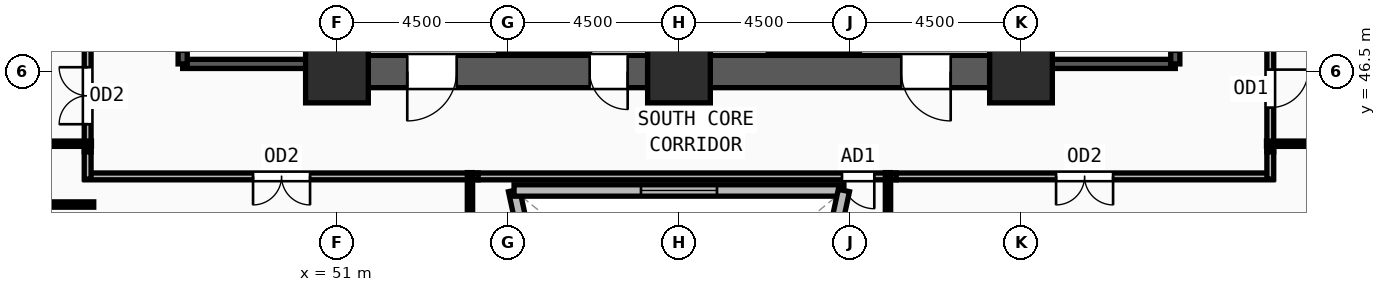
"""IFC4 building model, lengths in metres.
Left out: names, types, materials, properties, quantities, classifications, styles, units other than length and angle.
Written with IfcOpenShell. Run it as: python <this file> out.ifc"""

import sys

from ifc_helpers import new_model, si_unit, direction, frame, frame_2d, origin, origin_2d, place, context, subcontext, project, spatial, rectangle, extrude, source, transform, mapped, element, fill, save


model = new_model("IFC4")
c1 = context("Model", 3, precision=1e-05, world=origin(), true_north=direction((0.0, 1.0)))
c2 = subcontext(c1, "Body", "Model", "MODEL_VIEW")
j1 = project(units=[si_unit("LENGTHUNIT", "METRE"), si_unit("PLANEANGLEUNIT", "RADIAN")], contexts=[c1])
p1 = place(None, origin())
s1 = spatial("IfcSite", under=j1, at=p1, CompositionType="ELEMENT")
p2 = place(p1, origin())
s2 = spatial("IfcBuilding", under=s1, at=p2, CompositionType="ELEMENT")
p3 = place(p2, frame((0.0, 0.0, 51.75)))
s3 = spatial("IfcBuildingStorey", under=s2, at=p3, CompositionType="ELEMENT", Elevation=51.75)
m1 = source(origin(), c2, "Body", "SweptSolid", [
    extrude(rectangle(XDim=1.65, YDim=1.65, at=origin_2d()), origin(), (0.0, 0.0, 1.0), 3.75),
])
for number, where, z_axis, x_axis in (
    (1, (51.0, 46.5, 0.0), (0.0, 0.0, 1.0), (1.0, 0.0, 0.0)),
    (2, (60.0, 46.5, 0.0), (0.0, 0.0, 1.0), (1.0, 0.0, 0.0)),
    (3, (69.0, 46.5, 0.0), (0.0, 0.0, 1.0), (1.0, 0.0, 0.0)),
):
    element("IfcColumn", number, at=place(p3, frame(where, z_axis=z_axis, x_axis=x_axis)), inside=s3, PredefinedType="COLUMN", context=c2, shape_type="MappedRepresentation", body=[
        mapped(m1, transform((0.0, 0.0, 0.0), x_axis=(1.0, 0.0, 0.0), y_axis=(0.0, 1.0, 0.0), z_axis=(0.0, 0.0, 1.0), scale=1.0)),
    ])
p4 = place(p3, frame((68.175, 46.5, 0.0), z_axis=(0.0, 0.0, 1.0), x_axis=(-1.0, 0.0, 0.0)))
e4 = element("IfcWall", 4, at=p4, inside=s3, PredefinedType="SHEAR", context=c2, shape_type="SweptSolid", body=[
    extrude(rectangle(XDim=7.35, YDim=0.85, at=frame_2d((3.675, 0.0))), origin(), (0.0, 0.0, 1.0), 3.57),
])
m2 = source(origin(), c2, "Body", "SweptSolid", [
    extrude(rectangle(XDim=1.3, YDim=2.2, at=frame_2d((0.65, 1.1))), frame((0.0, 0.435, 0.0), z_axis=(0.0, -1.0, 0.0), x_axis=(1.0, 0.0, 0.0)), (0.0, 0.0, 1.0), 0.87),
])
p5 = place(p4, frame((1.025, 0.0, 0.0)))
e5 = element("IfcOpeningElement", 5, at=p5, cuts=e4, PredefinedType="OPENING", context=c2, shape_type="MappedRepresentation", body=[
    mapped(m2, transform((0.0, 0.0, 0.0), x_axis=(1.0, 0.0, 0.0), y_axis=(0.0, 1.0, 0.0), z_axis=(0.0, 0.0, 1.0), scale=1.0)),
])
p6 = place(p3, frame((59.175, 46.5, 0.0), z_axis=(0.0, 0.0, 1.0), x_axis=(-1.0, 0.0, 0.0)))
e6 = element("IfcWall", 6, at=p6, inside=s3, PredefinedType="SHEAR", context=c2, shape_type="SweptSolid", body=[
    extrude(rectangle(XDim=7.35, YDim=0.85, at=frame_2d((3.675, 0.0))), origin(), (0.0, 0.0, 1.0), 3.57),
])
p7 = place(p6, frame((5.025, 0.0, 0.0)))
e7 = element("IfcOpeningElement", 7, at=p7, cuts=e6, PredefinedType="OPENING", context=c2, shape_type="MappedRepresentation", body=[
    mapped(m2, transform((0.0, 0.0, 0.0), x_axis=(1.0, 0.0, 0.0), y_axis=(0.0, 1.0, 0.0), z_axis=(0.0, 0.0, 1.0), scale=1.0)),
])
m3 = source(origin(), c2, "Body", "SweptSolid", [
    extrude(rectangle(XDim=1.0, YDim=2.2, at=frame_2d((0.5, 1.1))), frame((0.0, 0.435, 0.0), z_axis=(0.0, -1.0, 0.0), x_axis=(1.0, 0.0, 0.0)), (0.0, 0.0, 1.0), 0.87),
])
p8 = place(p6, frame((0.525, 0.0, 0.0)))
e8 = element("IfcOpeningElement", 8, at=p8, cuts=e6, PredefinedType="OPENING", context=c2, shape_type="MappedRepresentation", body=[
    mapped(m3, transform((0.0, 0.0, 0.0), x_axis=(1.0, 0.0, 0.0), y_axis=(0.0, 1.0, 0.0), z_axis=(0.0, 0.0, 1.0), scale=1.0)),
])
p9 = place(p3, frame((46.94, 46.7, 0.0), z_axis=(0.0, 0.0, 1.0), x_axis=(1.0, 0.0, 0.0)))
e9 = element("IfcWall", 9, at=p9, inside=s3, PredefinedType="SOLIDWALL", context=c2, shape_type="SweptSolid", body=[
    extrude(rectangle(XDim=3.44, YDim=0.24, at=frame_2d((1.72, 0.0))), origin(), (0.0, 0.0, 1.0), 3.57),
])
p10 = place(p3, frame((50.38, 46.7, 0.0), z_axis=(0.0, 0.0, 1.0), x_axis=(0.0, 1.0, 0.0)))
e10 = element("IfcWall", 10, at=p10, inside=s3, PredefinedType="SOLIDWALL", context=c2, shape_type="SweptSolid", body=[
    extrude(rectangle(XDim=7.82, YDim=0.24, at=frame_2d((3.91, 0.0))), origin(), (0.0, 0.0, 1.0), 3.57),
])
p11 = place(p3, frame((46.94, 54.52, 0.0), z_axis=(0.0, 0.0, 1.0), x_axis=(0.0, -1.0, 0.0)))
e11 = element("IfcWall", 11, at=p11, inside=s3, PredefinedType="SOLIDWALL", context=c2, shape_type="SweptSolid", body=[
    extrude(rectangle(XDim=7.82, YDim=0.24, at=frame_2d((3.91, 0.0))), origin(), (0.0, 0.0, 1.0), 3.57),
])
m4 = source(origin(), c2, "Body", "SweptSolid", [
    extrude(rectangle(XDim=1.2, YDim=2.2, at=frame_2d((0.6, 1.1))), frame((0.0, 0.13, 0.0), z_axis=(0.0, -1.0, 0.0), x_axis=(1.0, 0.0, 0.0)), (0.0, 0.0, 1.0), 0.26),
])
p12 = place(p11, frame((6.3, 0.0, 0.0)))
e12 = element("IfcOpeningElement", 12, at=p12, cuts=e11, PredefinedType="OPENING", context=c2, shape_type="MappedRepresentation", body=[
    mapped(m4, transform((0.0, 0.0, 0.0), x_axis=(1.0, 0.0, 0.0), y_axis=(0.0, 1.0, 0.0), z_axis=(0.0, 0.0, 1.0), scale=1.0)),
])
p13 = place(p3, frame((69.62, 46.7, 0.0), z_axis=(0.0, 0.0, 1.0), x_axis=(1.0, 0.0, 0.0)))
e13 = element("IfcWall", 13, at=p13, inside=s3, PredefinedType="SOLIDWALL", context=c2, shape_type="SweptSolid", body=[
    extrude(rectangle(XDim=3.44, YDim=0.24, at=frame_2d((1.72, 0.0))), origin(), (0.0, 0.0, 1.0), 3.57),
])
p14 = place(p3, frame((73.06, 46.7, 0.0), z_axis=(0.0, 0.0, 1.0), x_axis=(0.0, 1.0, 0.0)))
e14 = element("IfcWall", 14, at=p14, inside=s3, PredefinedType="SOLIDWALL", context=c2, shape_type="SweptSolid", body=[
    extrude(rectangle(XDim=7.82, YDim=0.24, at=frame_2d((3.91, 0.0))), origin(), (0.0, 0.0, 1.0), 3.57),
])
p15 = place(p14, frame((0.32, 0.0, 0.0)))
e15 = element("IfcOpeningElement", 15, at=p15, cuts=e14, PredefinedType="OPENING", context=c2, shape_type="MappedRepresentation", body=[
    mapped(m4, transform((0.0, 0.0, 0.0), x_axis=(1.0, 0.0, 0.0), y_axis=(0.0, 1.0, 0.0), z_axis=(0.0, 0.0, 1.0), scale=1.0)),
])
p16 = place(p3, frame((69.62, 54.52, 0.0), z_axis=(0.0, 0.0, 1.0), x_axis=(0.0, -1.0, 0.0)))
e16 = element("IfcWall", 16, at=p16, inside=s3, PredefinedType="SOLIDWALL", context=c2, shape_type="SweptSolid", body=[
    extrude(rectangle(XDim=7.82, YDim=0.24, at=frame_2d((3.91, 0.0))), origin(), (0.0, 0.0, 1.0), 3.57),
])
p17 = place(p3, frame((57.179, 36.346, 0.0), z_axis=(0.0, 0.0, 1.0), x_axis=(-0.211373141383, 0.977405440491, 0.0)))
e17 = element("IfcWall", 17, at=p17, inside=s3, PredefinedType="SOLIDWALL", context=c2, shape_type="SweptSolid", body=[
    extrude(rectangle(XDim=7.187, YDim=0.3, at=frame_2d((3.593, 0.0))), origin(), (0.0, 0.0, 1.0), 3.57),
])
m5 = source(origin(), c2, "Body", "SweptSolid", [
    extrude(rectangle(XDim=2.0, YDim=1.9, at=frame_2d((1.0, 0.95))), frame((0.0, 0.16, 0.0), z_axis=(0.0, -1.0, 0.0), x_axis=(1.0, 0.0, 0.0)), (0.0, 0.0, 1.0), 0.32),
])
p18 = place(p17, frame((2.593, 0.0, 0.55)))
e18 = element("IfcOpeningElement", 18, at=p18, cuts=e17, PredefinedType="OPENING", context=c2, shape_type="MappedRepresentation", body=[
    mapped(m5, transform((0.0, 0.0, 0.0), x_axis=(1.0, 0.0, 0.0), y_axis=(0.0, 1.0, 0.0), z_axis=(0.0, 0.0, 1.0), scale=1.0)),
])
p19 = place(p3, frame((55.66, 43.37, 0.0), z_axis=(0.0, 0.0, 1.0), x_axis=(1.0, 0.0, 0.0)))
e19 = element("IfcWall", 19, at=p19, inside=s3, PredefinedType="SOLIDWALL", context=c2, shape_type="SweptSolid", body=[
    extrude(rectangle(XDim=8.68, YDim=0.3, at=frame_2d((4.34, 0.0))), origin(), (0.0, 0.0, 1.0), 3.57),
])
p20 = place(p19, frame((3.34, 0.0, 0.55)))
e20 = element("IfcOpeningElement", 20, at=p20, cuts=e19, PredefinedType="OPENING", context=c2, shape_type="MappedRepresentation", body=[
    mapped(m5, transform((0.0, 0.0, 0.0), x_axis=(1.0, 0.0, 0.0), y_axis=(0.0, 1.0, 0.0), z_axis=(0.0, 0.0, 1.0), scale=1.0)),
])
p21 = place(p3, frame((64.34, 43.37, 0.0), z_axis=(0.0, 0.0, 1.0), x_axis=(-0.211373141383, -0.977405440491, 0.0)))
e21 = element("IfcWall", 21, at=p21, inside=s3, PredefinedType="SOLIDWALL", context=c2, shape_type="SweptSolid", body=[
    extrude(rectangle(XDim=7.187, YDim=0.3, at=frame_2d((3.593, 0.0))), origin(), (0.0, 0.0, 1.0), 3.57),
])
p22 = place(p21, frame((2.593, 0.0, 0.55)))
e22 = element("IfcOpeningElement", 22, at=p22, cuts=e21, PredefinedType="OPENING", context=c2, shape_type="MappedRepresentation", body=[
    mapped(m5, transform((0.0, 0.0, 0.0), x_axis=(1.0, 0.0, 0.0), y_axis=(0.0, 1.0, 0.0), z_axis=(0.0, 0.0, 1.0), scale=1.0)),
])
p23 = place(p3, frame((44.44, 44.385, 0.0), z_axis=(0.0, 0.0, 1.0), x_axis=(0.0, 1.0, 0.0)))
e23 = element("IfcWall", 23, at=p23, inside=s3, PredefinedType="PARTITIONING", context=c2, shape_type="SweptSolid", body=[
    extrude(rectangle(XDim=2.955, YDim=0.18, at=frame_2d((1.478, 0.0))), origin(), (0.0, 0.0, 1.0), 3.57),
])
m6 = source(origin(), c2, "Body", "SweptSolid", [
    extrude(rectangle(XDim=1.5, YDim=2.2, at=frame_2d((0.75, 1.1))), frame((0.0, 0.1, 0.0), z_axis=(0.0, -1.0, 0.0), x_axis=(1.0, 0.0, 0.0)), (0.0, 0.0, 1.0), 0.2),
])
p24 = place(p23, frame((0.728, 0.0, 0.0)))
e24 = element("IfcOpeningElement", 24, at=p24, cuts=e23, PredefinedType="OPENING", context=c2, shape_type="MappedRepresentation", body=[
    mapped(m6, transform((0.0, 0.0, 0.0), x_axis=(1.0, 0.0, 0.0), y_axis=(0.0, 1.0, 0.0), z_axis=(0.0, 0.0, 1.0), scale=1.0)),
])
p25 = place(p3, frame((54.715, 43.74, 0.0), z_axis=(0.0, 0.0, 1.0), x_axis=(-1.0, 0.0, 0.0)))
e25 = element("IfcWall", 25, at=p25, inside=s3, PredefinedType="PARTITIONING", context=c2, shape_type="SweptSolid", body=[
    extrude(rectangle(XDim=10.345, YDim=0.18, at=frame_2d((5.172, 0.0))), origin(), (0.0, 0.0, 1.0), 3.57),
])
p26 = place(p25, frame((4.423, 0.0, 0.0)))
e26 = element("IfcOpeningElement", 26, at=p26, cuts=e25, PredefinedType="OPENING", context=c2, shape_type="MappedRepresentation", body=[
    mapped(m6, transform((0.0, 0.0, 0.0), x_axis=(1.0, 0.0, 0.0), y_axis=(0.0, 1.0, 0.0), z_axis=(0.0, 0.0, 1.0), scale=1.0)),
])
p27 = place(p3, frame((65.715, 43.74, 0.0), z_axis=(0.0, 0.0, 1.0), x_axis=(-1.0, 0.0, 0.0)))
e27 = element("IfcWall", 27, at=p27, inside=s3, PredefinedType="PARTITIONING", context=c2, shape_type="SweptSolid", body=[
    extrude(rectangle(XDim=11.0, YDim=0.18, at=frame_2d((5.5, 0.0))), origin(), (0.0, 0.0, 1.0), 3.57),
])
m7 = source(origin(), c2, "Body", "SweptSolid", [
    extrude(rectangle(XDim=0.85, YDim=2.1, at=frame_2d((0.425, 1.05))), frame((0.0, 0.1, 0.0), z_axis=(0.0, -1.0, 0.0), x_axis=(1.0, 0.0, 0.0)), (0.0, 0.0, 1.0), 0.2),
])
p28 = place(p27, frame((0.575, 0.0, 0.0)))
e28 = element("IfcOpeningElement", 28, at=p28, cuts=e27, PredefinedType="OPENING", context=c2, shape_type="MappedRepresentation", body=[
    mapped(m7, transform((0.0, 0.0, 0.0), x_axis=(1.0, 0.0, 0.0), y_axis=(0.0, 1.0, 0.0), z_axis=(0.0, 0.0, 1.0), scale=1.0)),
])
p29 = place(p3, frame((75.63, 43.74, 0.0), z_axis=(0.0, 0.0, 1.0), x_axis=(-1.0, 0.0, 0.0)))
e29 = element("IfcWall", 29, at=p29, inside=s3, PredefinedType="PARTITIONING", context=c2, shape_type="SweptSolid", body=[
    extrude(rectangle(XDim=9.915, YDim=0.18, at=frame_2d((4.958, 0.0))), origin(), (0.0, 0.0, 1.0), 3.57),
])
p30 = place(p29, frame((4.207, 0.0, 0.0)))
e30 = element("IfcOpeningElement", 30, at=p30, cuts=e29, PredefinedType="OPENING", context=c2, shape_type="MappedRepresentation", body=[
    mapped(m6, transform((0.0, 0.0, 0.0), x_axis=(1.0, 0.0, 0.0), y_axis=(0.0, 1.0, 0.0), z_axis=(0.0, 0.0, 1.0), scale=1.0)),
])
p31 = place(p3, frame((75.56, 47.715, 0.0), z_axis=(0.0, 0.0, 1.0), x_axis=(0.0, -1.0, 0.0)))
e31 = element("IfcWall", 31, at=p31, inside=s3, PredefinedType="PARTITIONING", context=c2, shape_type="SweptSolid", body=[
    extrude(rectangle(XDim=3.33, YDim=0.18, at=frame_2d((1.665, 0.0))), origin(), (0.0, 0.0, 1.0), 3.57),
])
m8 = source(origin(), c2, "Body", "SweptSolid", [
    extrude(rectangle(XDim=1.0, YDim=2.2, at=frame_2d((0.5, 1.1))), frame((0.0, 0.1, 0.0), z_axis=(0.0, -1.0, 0.0), x_axis=(1.0, 0.0, 0.0)), (0.0, 0.0, 1.0), 0.2),
])
p32 = place(p31, frame((1.165, 0.0, 0.0)))
e32 = element("IfcOpeningElement", 32, at=p32, cuts=e31, PredefinedType="OPENING", context=c2, shape_type="MappedRepresentation", body=[
    mapped(m8, transform((0.0, 0.0, 0.0), x_axis=(1.0, 0.0, 0.0), y_axis=(0.0, 1.0, 0.0), z_axis=(0.0, 0.0, 1.0), scale=1.0)),
])
for number, where, z_axis, x_axis in (
    (33, (44.44, 43.67, 0.0), (0.0, 0.0, 1.0), (0.0, 1.0, 0.0)),
    (34, (75.56, 44.385, 0.0), (0.0, 0.0, 1.0), (0.0, -1.0, 0.0)),
):
    element("IfcWall", number, at=place(p3, frame(where, z_axis=z_axis, x_axis=x_axis)), inside=s3, PredefinedType="PARTITIONING", context=c2, shape_type="SweptSolid", body=[
        extrude(rectangle(XDim=0.715, YDim=0.18, at=frame_2d((0.357, 0.0))), origin(), (0.0, 0.0, 1.0), 3.57),
    ])
p33 = place(p3, frame((44.6, 43.0, 0.0), z_axis=(0.0, 0.0, 1.0), x_axis=(-1.0, 0.0, 0.0)))
e35 = element("IfcWall", 35, at=p33, inside=s3, PredefinedType="PARTITIONING", context=c2, shape_type="SweptSolid", body=[
    extrude(rectangle(XDim=10.762, YDim=0.14, at=frame_2d((5.381, 0.0))), origin(), (0.0, 0.0, 1.0), 3.57),
])
p34 = place(p3, frame((44.54, 44.6, 0.0), z_axis=(0.0, 0.0, 1.0), x_axis=(-1.0, 0.0, 0.0)))
e36 = element("IfcWall", 36, at=p34, inside=s3, PredefinedType="PARTITIONING", context=c2, shape_type="SweptSolid", body=[
    extrude(rectangle(XDim=11.51, YDim=0.14, at=frame_2d((5.755, 0.0))), origin(), (0.0, 0.0, 1.0), 3.57),
])
p35 = place(p3, frame((75.46, 44.6, 0.0), z_axis=(0.0, 0.0, 1.0), x_axis=(1.0, 0.0, 0.0)))
e37 = element("IfcWall", 37, at=p35, inside=s3, PredefinedType="PARTITIONING", context=c2, shape_type="SweptSolid", body=[
    extrude(rectangle(XDim=11.848, YDim=0.14, at=frame_2d((5.924, 0.0))), origin(), (0.0, 0.0, 1.0), 2.705),
])
for number, where, z_axis, x_axis in (
    (38, (54.5, 43.84, 0.0), (0.0, 0.0, 1.0), (0.0, -1.0, 0.0)),
    (39, (65.5, 43.84, 0.0), (0.0, 0.0, 1.0), (0.0, -1.0, 0.0)),
):
    element("IfcWall", number, at=place(p3, frame(where, z_axis=z_axis, x_axis=x_axis)), inside=s3, PredefinedType="PARTITIONING", context=c2, shape_type="SweptSolid", body=[
        extrude(rectangle(XDim=31.164, YDim=0.14, at=frame_2d((15.582, 0.0))), origin(), (0.0, 0.0, 1.0), 3.57),
    ])
m9 = source(origin(), c2, "Body", "SweptSolid", [
    extrude(rectangle(XDim=1.3, YDim=2.2, at=frame_2d((0.65, 1.1))), frame((0.0, 0.025, 0.0), z_axis=(0.0, -1.0, 0.0), x_axis=(1.0, 0.0, 0.0)), (0.0, 0.0, 1.0), 0.05),
])
p36 = place(p7, origin())
e40 = element("IfcDoor", 40, at=p36, inside=s3, OperationType="SINGLE_SWING_RIGHT", PredefinedType="DOOR", context=c2, shape_type="MappedRepresentation", body=[
    mapped(m9, transform((0.0, 0.0, 0.0), x_axis=(1.0, 0.0, 0.0), y_axis=(0.0, 1.0, 0.0), z_axis=(0.0, 0.0, 1.0), scale=1.0)),
])
fill(e7, e40)
m10 = source(origin(), c2, "Body", "SweptSolid", [
    extrude(rectangle(XDim=1.0, YDim=2.2, at=frame_2d((0.5, 1.1))), frame((0.0, 0.025, 0.0), z_axis=(0.0, -1.0, 0.0), x_axis=(1.0, 0.0, 0.0)), (0.0, 0.0, 1.0), 0.05),
])
p37 = place(p8, origin())
e41 = element("IfcDoor", 41, at=p37, inside=s3, OperationType="SINGLE_SWING_LEFT", PredefinedType="DOOR", context=c2, shape_type="MappedRepresentation", body=[
    mapped(m10, transform((0.0, 0.0, 0.0), x_axis=(1.0, 0.0, 0.0), y_axis=(0.0, 1.0, 0.0), z_axis=(0.0, 0.0, 1.0), scale=1.0)),
])
fill(e8, e41)
p38 = place(p5, origin())
e42 = element("IfcDoor", 42, at=p38, inside=s3, OperationType="SINGLE_SWING_LEFT", PredefinedType="DOOR", context=c2, shape_type="MappedRepresentation", body=[
    mapped(m9, transform((0.0, 0.0, 0.0), x_axis=(1.0, 0.0, 0.0), y_axis=(0.0, 1.0, 0.0), z_axis=(0.0, 0.0, 1.0), scale=1.0)),
])
fill(e5, e42)
m11 = source(origin(), c2, "Body", "SweptSolid", [
    extrude(rectangle(XDim=2.0, YDim=1.9, at=frame_2d((1.0, 0.95))), frame((0.0, 0.03, 0.0), z_axis=(0.0, -1.0, 0.0), x_axis=(1.0, 0.0, 0.0)), (0.0, 0.0, 1.0), 0.06),
])
p39 = place(p20, origin())
e43 = element("IfcWindow", 43, at=p39, inside=s3, PartitioningType="DOUBLE_PANEL_VERTICAL", PredefinedType="WINDOW", context=c2, shape_type="MappedRepresentation", body=[
    mapped(m11, transform((0.0, 0.0, 0.0), x_axis=(1.0, 0.0, 0.0), y_axis=(0.0, 1.0, 0.0), z_axis=(0.0, 0.0, 1.0), scale=1.0)),
])
fill(e20, e43)
m12 = source(origin(), c2, "Body", "SweptSolid", [
    extrude(rectangle(XDim=1.5, YDim=2.2, at=frame_2d((0.75, 1.1))), frame((0.0, 0.025, 0.0), z_axis=(0.0, -1.0, 0.0), x_axis=(1.0, 0.0, 0.0)), (0.0, 0.0, 1.0), 0.05),
])
p40 = place(p24, origin())
e44 = element("IfcDoor", 44, at=p40, inside=s3, OperationType="DOUBLE_DOOR_SINGLE_SWING", PredefinedType="DOOR", context=c2, shape_type="MappedRepresentation", body=[
    mapped(m12, transform((0.0, 0.0, 0.0), x_axis=(1.0, 0.0, 0.0), y_axis=(0.0, 1.0, 0.0), z_axis=(0.0, 0.0, 1.0), scale=1.0)),
])
fill(e24, e44)
p41 = place(p26, origin())
e45 = element("IfcDoor", 45, at=p41, inside=s3, OperationType="DOUBLE_DOOR_SINGLE_SWING", PredefinedType="DOOR", context=c2, shape_type="MappedRepresentation", body=[
    mapped(m12, transform((0.0, 0.0, 0.0), x_axis=(1.0, 0.0, 0.0), y_axis=(0.0, 1.0, 0.0), z_axis=(0.0, 0.0, 1.0), scale=1.0)),
])
fill(e26, e45)
m13 = source(origin(), c2, "Body", "SweptSolid", [
    extrude(rectangle(XDim=0.85, YDim=2.1, at=frame_2d((0.425, 1.05))), frame((0.0, 0.025, 0.0), z_axis=(0.0, -1.0, 0.0), x_axis=(1.0, 0.0, 0.0)), (0.0, 0.0, 1.0), 0.05),
])
p42 = place(p28, origin())
e46 = element("IfcDoor", 46, at=p42, inside=s3, OperationType="SINGLE_SWING_LEFT", PredefinedType="DOOR", context=c2, shape_type="MappedRepresentation", body=[
    mapped(m13, transform((0.0, 0.0, 0.0), x_axis=(1.0, 0.0, 0.0), y_axis=(0.0, 1.0, 0.0), z_axis=(0.0, 0.0, 1.0), scale=1.0)),
])
fill(e28, e46)
p43 = place(p30, origin())
e47 = element("IfcDoor", 47, at=p43, inside=s3, OperationType="DOUBLE_DOOR_SINGLE_SWING", PredefinedType="DOOR", context=c2, shape_type="MappedRepresentation", body=[
    mapped(m12, transform((0.0, 0.0, 0.0), x_axis=(1.0, 0.0, 0.0), y_axis=(0.0, 1.0, 0.0), z_axis=(0.0, 0.0, 1.0), scale=1.0)),
])
fill(e30, e47)
p44 = place(p32, origin())
e48 = element("IfcDoor", 48, at=p44, inside=s3, OperationType="SINGLE_SWING_LEFT", PredefinedType="DOOR", context=c2, shape_type="MappedRepresentation", body=[
    mapped(m10, transform((0.0, 0.0, 0.0), x_axis=(1.0, 0.0, 0.0), y_axis=(0.0, 1.0, 0.0), z_axis=(0.0, 0.0, 1.0), scale=1.0)),
])
fill(e32, e48)
save(model, sys.argv[1])
